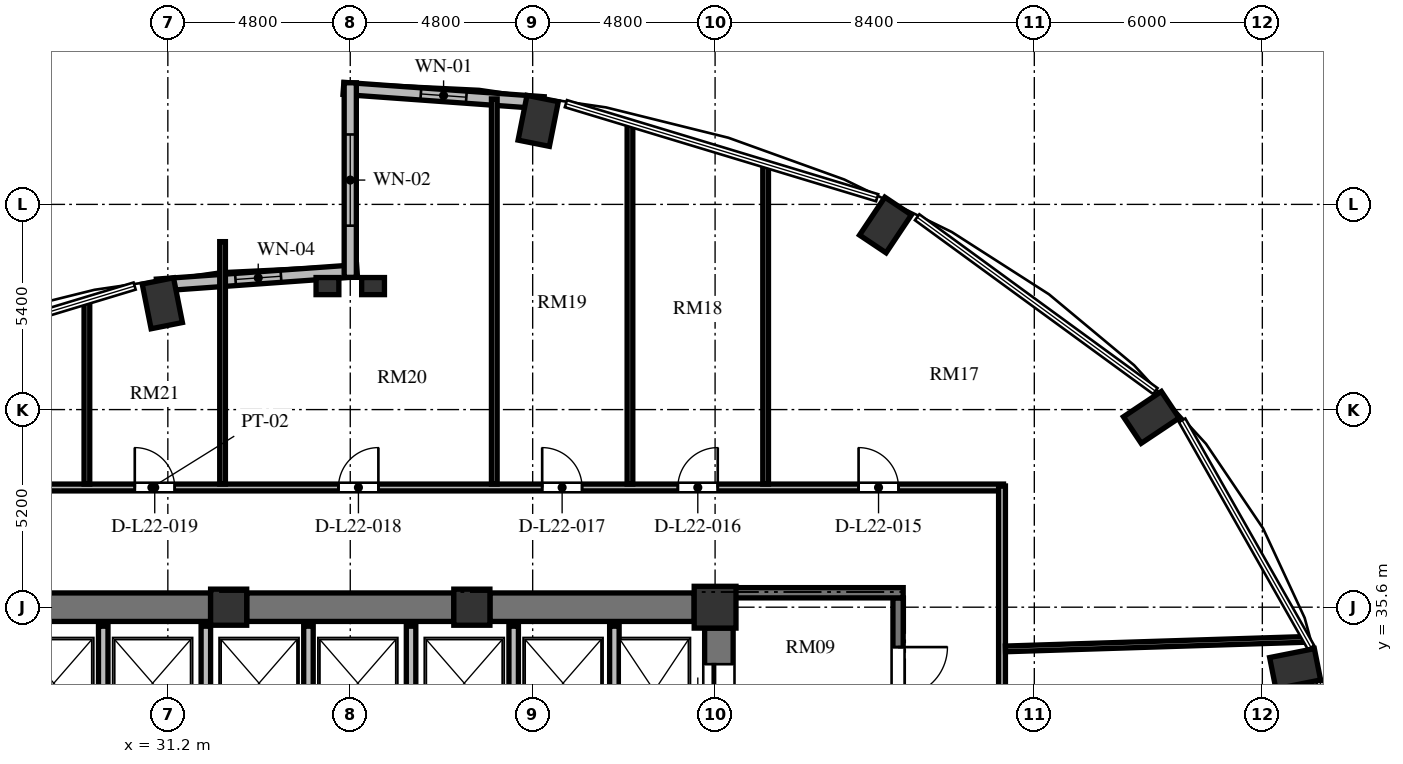
"""IFC4 building model, lengths in metres.
Left out: names, types, materials, properties, quantities, classifications, styles, units other than length and angle.
Written with IfcOpenShell. Run it as: python <this file> out.ifc"""

import sys

from ifc_helpers import new_model, si_unit, direction, frame, frame_2d, origin, origin_2d, place, context, subcontext, project, spatial, rectangle, extrude, element, fill, save


model = new_model("IFC4")
c1 = context("Model", 3, precision=1e-05, world=origin(), true_north=direction((0.0, 1.0)))
c2 = subcontext(c1, "Body", "Model", "MODEL_VIEW")
j1 = project(units=[si_unit("LENGTHUNIT", "METRE"), si_unit("PLANEANGLEUNIT", "RADIAN")], contexts=[c1])
p1 = place(None, origin())
s1 = spatial("IfcSite", under=j1, at=p1, CompositionType="ELEMENT")
p2 = place(p1, origin())
s2 = spatial("IfcBuilding", under=s1, at=p2, CompositionType="ELEMENT")
p3 = place(p2, frame((0.0, 0.0, 89.04)))
s3 = spatial("IfcBuildingStorey", under=s2, at=p3, CompositionType="ELEMENT", Elevation=89.04)
for number, where, z_axis, x_axis in (
    (1, (60.863, 33.98, 0.0), (0.0, 0.0, 1.0), (0.981, 0.195, 0.0)),
    (2, (57.078, 40.595, 0.0), (0.0, 0.0, 1.0), (0.831, 0.556, 0.0)),
    (3, (50.084, 45.657, 0.0), (0.0, 0.0, 1.0), (0.556, 0.831, 0.0)),
    (4, (40.946, 48.397, 0.0), (0.0, 0.0, 1.0), (0.195, 0.981, 0.0)),
    (5, (31.054, 43.597, 0.0), (0.0, 0.0, 1.0), (-0.195, 0.981, 0.0)),
):
    element("IfcColumn", number, at=place(p3, frame(where, z_axis=z_axis, x_axis=x_axis)), inside=s3, PredefinedType="COLUMN", context=c2, shape_type="SweptSolid", body=[
        extrude(rectangle(XDim=1.2, YDim=0.84, at=origin_2d()), origin(), (0.0, 0.0, 1.0), 3.648),
    ])
p4 = place(p3, frame((45.6, 35.6, 0.0), z_axis=(0.0, 0.0, 1.0), x_axis=(1.0, 0.0, 0.0)))
e6 = element("IfcColumn", 6, at=p4, inside=s3, PredefinedType="COLUMN", context=c2, shape_type="SweptSolid", body=[
    extrude(rectangle(XDim=1.1, YDim=1.1, at=origin_2d()), origin(), (0.0, 0.0, 1.0), 3.648),
])
for number, where, z_axis, x_axis in (
    (7, (39.2, 35.6, 0.0), (0.0, 0.0, 1.0), (1.0, 0.0, 0.0)),
    (8, (32.8, 35.6, 0.0), (0.0, 0.0, 1.0), (1.0, 0.0, 0.0)),
):
    element("IfcColumn", number, at=place(p3, frame(where, z_axis=z_axis, x_axis=x_axis)), inside=s3, PredefinedType="COLUMN", context=c2, shape_type="SweptSolid", body=[
        extrude(rectangle(XDim=0.95, YDim=0.95, at=origin_2d()), origin(), (0.0, 0.0, 1.0), 3.648),
    ])
for number, where, z_axis, x_axis in (
    (9, (35.4, 44.05, 0.0), (0.0, 0.0, 1.0), (1.0, 0.0, 0.0)),
    (10, (36.6, 44.05, 0.0), (0.0, 0.0, 1.0), (1.0, 0.0, 0.0)),
):
    element("IfcColumn", number, at=place(p3, frame(where, z_axis=z_axis, x_axis=x_axis)), inside=s3, PredefinedType="PILASTER", context=c2, shape_type="SweptSolid", body=[
        extrude(rectangle(XDim=0.6, YDim=0.45, at=origin_2d()), origin(), (0.0, 0.0, 1.0), 3.648),
    ])
p5 = place(p3, frame((45.7, 20.95, 0.0), z_axis=(0.0, 0.0, 1.0), x_axis=(0.0, 1.0, 0.0)))
e11 = element("IfcWall", 11, at=p5, inside=s3, PredefinedType="SHEAR", context=c2, shape_type="SweptSolid", body=[
    extrude(rectangle(XDim=14.1, YDim=0.75, at=frame_2d((7.05, 0.0))), origin(), (0.0, 0.0, 1.0), 3.648),
])
p6 = place(p5, frame((11.75, 0.0, 0.0)))
e12 = element("IfcOpeningElement", 12, at=p6, cuts=e11, PredefinedType="OPENING", context=c2, shape_type="SweptSolid", body=[
    extrude(rectangle(XDim=1.4, YDim=2.3, at=frame_2d((0.7, 1.15))), frame((0.0, 0.385, 0.0), z_axis=(0.0, -1.0, 0.0), x_axis=(1.0, 0.0, 0.0)), (0.0, 0.0, 1.0), 0.77),
])
p7 = place(p5, frame((0.95, 0.0, 0.0)))
e13 = element("IfcOpeningElement", 13, at=p7, cuts=e11, PredefinedType="OPENING", context=c2, shape_type="SweptSolid", body=[
    extrude(rectangle(XDim=1.4, YDim=2.3, at=frame_2d((0.7, 1.15))), frame((0.0, 0.385, 0.0), z_axis=(0.0, -1.0, 0.0), x_axis=(1.0, 0.0, 0.0)), (0.0, 0.0, 1.0), 0.77),
])
p8 = place(p3, frame((26.95, 35.6, 0.0), z_axis=(0.0, 0.0, 1.0), x_axis=(1.0, 0.0, 0.0)))
e14 = element("IfcWall", 14, at=p8, inside=s3, PredefinedType="SHEAR", context=c2, shape_type="SweptSolid", body=[
    extrude(rectangle(XDim=5.375, YDim=0.75, at=frame_2d((2.688, 0.0))), origin(), (0.0, 0.0, 1.0), 3.648),
])
p9 = place(p3, frame((33.275, 35.6, 0.0), z_axis=(0.0, 0.0, 1.0), x_axis=(1.0, 0.0, 0.0)))
e15 = element("IfcWall", 15, at=p9, inside=s3, PredefinedType="SHEAR", context=c2, shape_type="SweptSolid", body=[
    extrude(rectangle(XDim=5.45, YDim=0.75, at=frame_2d((2.725, 0.0))), origin(), (0.0, 0.0, 1.0), 3.648),
])
p10 = place(p3, frame((39.675, 35.6, 0.0), z_axis=(0.0, 0.0, 1.0), x_axis=(1.0, 0.0, 0.0)))
e16 = element("IfcWall", 16, at=p10, inside=s3, PredefinedType="SHEAR", context=c2, shape_type="SweptSolid", body=[
    extrude(rectangle(XDim=5.375, YDim=0.75, at=frame_2d((2.688, 0.0))), origin(), (0.0, 0.0, 1.0), 3.648),
])
p11 = place(p3, frame((41.091, 48.875, 0.0), z_axis=(0.0, 0.0, 1.0), x_axis=(-0.997432364291, 0.071614793619, 0.0)))
e17 = element("IfcWall", 17, at=p11, inside=s3, PredefinedType="SOLIDWALL", context=c2, shape_type="SweptSolid", body=[
    extrude(rectangle(XDim=5.284, YDim=0.32, at=frame_2d((2.642, 0.0))), origin(), (0.0, 0.0, 1.0), 3.428),
])
p12 = place(p11, frame((2.042, 0.0, 0.85)))
e18 = element("IfcOpeningElement", 18, at=p12, cuts=e17, PredefinedType="OPENING", context=c2, shape_type="SweptSolid", body=[
    extrude(rectangle(XDim=1.2, YDim=2.2, at=frame_2d((0.6, 1.1))), frame((0.0, 0.17, 0.0), z_axis=(0.0, -1.0, 0.0), x_axis=(1.0, 0.0, 0.0)), (0.0, 0.0, 1.0), 0.34),
])
p13 = place(p3, frame((36.179, 44.453, 0.0), z_axis=(0.0, 0.0, 1.0), x_axis=(-0.997431890304, -0.071621394884, 0.0)))
e19 = element("IfcWall", 19, at=p13, inside=s3, PredefinedType="SOLIDWALL", context=c2, shape_type="SweptSolid", body=[
    extrude(rectangle(XDim=5.284, YDim=0.32, at=frame_2d((2.642, 0.0))), origin(), (0.0, 0.0, 1.0), 3.428),
])
p14 = place(p13, frame((2.007, 0.0, 0.85)))
e20 = element("IfcOpeningElement", 20, at=p14, cuts=e19, PredefinedType="OPENING", context=c2, shape_type="SweptSolid", body=[
    extrude(rectangle(XDim=1.2, YDim=1.8, at=frame_2d((0.6, 0.9))), frame((0.0, 0.17, 0.0), z_axis=(0.0, -1.0, 0.0), x_axis=(1.0, 0.0, 0.0)), (0.0, 0.0, 1.0), 0.34),
])
p15 = place(p3, frame((36.0, 49.4, 0.0), z_axis=(0.0, 0.0, 1.0), x_axis=(0.0, -1.0, 0.0)))
e21 = element("IfcWall", 21, at=p15, inside=s3, PredefinedType="SOLIDWALL", context=c2, shape_type="SweptSolid", body=[
    extrude(rectangle(XDim=5.12, YDim=0.32, at=frame_2d((2.56, 0.0))), origin(), (0.0, 0.0, 1.0), 3.428),
])
p16 = place(p15, frame((1.36, 0.0, 0.84)))
e22 = element("IfcOpeningElement", 22, at=p16, cuts=e21, PredefinedType="OPENING", context=c2, shape_type="SweptSolid", body=[
    extrude(rectangle(XDim=2.4, YDim=2.04, at=frame_2d((1.2, 1.02))), frame((0.0, 0.17, 0.0), z_axis=(0.0, -1.0, 0.0), x_axis=(1.0, 0.0, 0.0)), (0.0, 0.0, 1.0), 0.34),
])
p17 = place(p3, frame((42.95, 31.92, 0.0), z_axis=(0.0, 0.0, 1.0), x_axis=(0.0, 1.0, 0.0)))
e23 = element("IfcWall", 23, at=p17, inside=s3, PredefinedType="SOLIDWALL", context=c2, shape_type="SweptSolid", body=[
    extrude(rectangle(XDim=3.18, YDim=0.25, at=frame_2d((1.59, 0.0))), origin(), (0.0, 0.0, 1.0), 3.428),
])
for number, where, z_axis, x_axis in (
    (24, (29.5, 32.42, 0.0), (0.0, 0.0, 1.0), (0.0, 1.0, 0.0)),
    (25, (32.2, 32.42, 0.0), (0.0, 0.0, 1.0), (0.0, 1.0, 0.0)),
    (26, (34.9, 32.42, 0.0), (0.0, 0.0, 1.0), (0.0, 1.0, 0.0)),
    (27, (37.6, 32.42, 0.0), (0.0, 0.0, 1.0), (0.0, 1.0, 0.0)),
    (28, (40.3, 32.42, 0.0), (0.0, 0.0, 1.0), (0.0, 1.0, 0.0)),
):
    element("IfcWall", number, at=place(p3, frame(where, z_axis=z_axis, x_axis=x_axis)), inside=s3, PredefinedType="SOLIDWALL", context=c2, shape_type="SweptSolid", body=[
        extrude(rectangle(XDim=2.68, YDim=0.25, at=frame_2d((1.34, 0.0))), origin(), (0.0, 0.0, 1.0), 3.428),
    ])
p18 = place(p3, frame((50.415, 35.845, 0.0), z_axis=(0.0, 0.0, 1.0), x_axis=(0.0, -1.0, 0.0)))
e29 = element("IfcWall", 29, at=p18, inside=s3, PredefinedType="SHEAR", context=c2, shape_type="SweptSolid", body=[
    extrude(rectangle(XDim=15.825, YDim=0.27, at=frame_2d((7.913, 0.0))), origin(), (0.0, 0.0, 1.0), 3.648),
])
p19 = place(p18, frame((4.445, 0.0, 0.0)))
e30 = element("IfcOpeningElement", 30, at=p19, cuts=e29, PredefinedType="OPENING", context=c2, shape_type="SweptSolid", body=[
    extrude(rectangle(XDim=1.2, YDim=2.15, at=frame_2d((0.6, 1.075))), frame((0.0, 0.145, 0.0), z_axis=(0.0, -1.0, 0.0), x_axis=(1.0, 0.0, 0.0)), (0.0, 0.0, 1.0), 0.29),
])
p20 = place(p18, frame((1.295, 0.0, 0.0)))
e31 = element("IfcOpeningElement", 31, at=p20, cuts=e29, PredefinedType="OPENING", context=c2, shape_type="SweptSolid", body=[
    extrude(rectangle(XDim=1.3, YDim=2.2, at=frame_2d((0.65, 1.1))), frame((0.0, 0.145, 0.0), z_axis=(0.0, -1.0, 0.0), x_axis=(1.0, 0.0, 0.0)), (0.0, 0.0, 1.0), 0.29),
])
p21 = place(p18, frame((13.095, 0.0, 0.0)))
e32 = element("IfcOpeningElement", 32, at=p21, cuts=e29, PredefinedType="OPENING", context=c2, shape_type="SweptSolid", body=[
    extrude(rectangle(XDim=1.3, YDim=2.2, at=frame_2d((0.65, 1.1))), frame((0.0, 0.145, 0.0), z_axis=(0.0, -1.0, 0.0), x_axis=(1.0, 0.0, 0.0)), (0.0, 0.0, 1.0), 0.29),
])
p22 = place(p3, frame((46.075, 35.98, 0.0), z_axis=(0.0, 0.0, 1.0), x_axis=(1.0, 0.0, 0.0)))
e33 = element("IfcWall", 33, at=p22, inside=s3, PredefinedType="SHEAR", context=c2, shape_type="SweptSolid", body=[
    extrude(rectangle(XDim=4.475, YDim=0.27, at=frame_2d((2.238, 0.0))), origin(), (0.0, 0.0, 1.0), 3.648),
])
p23 = place(p3, frame((23.31, 38.75, 0.0), z_axis=(0.0, 0.0, 1.0), x_axis=(1.0, 0.0, 0.0)))
e34 = element("IfcWall", 34, at=p23, inside=s3, PredefinedType="PARTITIONING", context=c2, shape_type="SweptSolid", body=[
    extrude(rectangle(XDim=29.88, YDim=0.18, at=frame_2d((14.94, 0.0))), origin(), (0.0, 0.0, 1.0), 3.053),
])
p24 = place(p23, frame((26.066, 0.0, 0.0)))
e35 = element("IfcOpeningElement", 35, at=p24, cuts=e34, PredefinedType="OPENING", context=c2, shape_type="SweptSolid", body=[
    extrude(rectangle(XDim=1.05, YDim=2.15, at=frame_2d((0.525, 1.075))), frame((0.0, 0.1, 0.0), z_axis=(0.0, -1.0, 0.0), x_axis=(1.0, 0.0, 0.0)), (0.0, 0.0, 1.0), 0.2),
])
p25 = place(p23, frame((21.31, 0.0, 0.0)))
e36 = element("IfcOpeningElement", 36, at=p25, cuts=e34, PredefinedType="OPENING", context=c2, shape_type="SweptSolid", body=[
    extrude(rectangle(XDim=1.05, YDim=2.15, at=frame_2d((0.525, 1.075))), frame((0.0, 0.1, 0.0), z_axis=(0.0, -1.0, 0.0), x_axis=(1.0, 0.0, 0.0)), (0.0, 0.0, 1.0), 0.2),
])
p26 = place(p23, frame((17.74, 0.0, 0.0)))
e37 = element("IfcOpeningElement", 37, at=p26, cuts=e34, PredefinedType="OPENING", context=c2, shape_type="SweptSolid", body=[
    extrude(rectangle(XDim=1.05, YDim=2.15, at=frame_2d((0.525, 1.075))), frame((0.0, 0.1, 0.0), z_axis=(0.0, -1.0, 0.0), x_axis=(1.0, 0.0, 0.0)), (0.0, 0.0, 1.0), 0.2),
])
p27 = place(p23, frame((12.38, 0.0, 0.0)))
e38 = element("IfcOpeningElement", 38, at=p27, cuts=e34, PredefinedType="OPENING", context=c2, shape_type="SweptSolid", body=[
    extrude(rectangle(XDim=1.05, YDim=2.15, at=frame_2d((0.525, 1.075))), frame((0.0, 0.1, 0.0), z_axis=(0.0, -1.0, 0.0), x_axis=(1.0, 0.0, 0.0)), (0.0, 0.0, 1.0), 0.2),
])
p28 = place(p23, frame((7.02, 0.0, 0.0)))
e39 = element("IfcOpeningElement", 39, at=p28, cuts=e34, PredefinedType="OPENING", context=c2, shape_type="SweptSolid", body=[
    extrude(rectangle(XDim=1.05, YDim=2.15, at=frame_2d((0.525, 1.075))), frame((0.0, 0.1, 0.0), z_axis=(0.0, -1.0, 0.0), x_axis=(1.0, 0.0, 0.0)), (0.0, 0.0, 1.0), 0.2),
])
p29 = place(p23, frame((2.514, 0.0, 0.0)))
e40 = element("IfcOpeningElement", 40, at=p29, cuts=e34, PredefinedType="OPENING", context=c2, shape_type="SweptSolid", body=[
    extrude(rectangle(XDim=1.05, YDim=2.15, at=frame_2d((0.525, 1.075))), frame((0.0, 0.1, 0.0), z_axis=(0.0, -1.0, 0.0), x_axis=(1.0, 0.0, 0.0)), (0.0, 0.0, 1.0), 0.2),
])
p30 = place(p3, frame((53.15, 38.79, 0.0), z_axis=(0.0, 0.0, 1.0), x_axis=(0.0, -1.0, 0.0)))
e41 = element("IfcWall", 41, at=p30, inside=s3, PredefinedType="PARTITIONING", context=c2, shape_type="SweptSolid", body=[
    extrude(rectangle(XDim=9.43, YDim=0.18, at=frame_2d((4.715, 0.0))), origin(), (0.0, 0.0, 1.0), 3.428),
])
p31 = place(p3, frame((53.24, 34.502, 0.0), z_axis=(0.0, 0.0, 1.0), x_axis=(0.999499445349, 0.031636351679, 0.0)))
e42 = element("IfcWall", 42, at=p31, inside=s3, PredefinedType="PARTITIONING", context=c2, shape_type="SweptSolid", body=[
    extrude(rectangle(XDim=7.933, YDim=0.15, at=frame_2d((3.967, 0.0))), origin(), (0.0, 0.0, 1.0), 2.813),
])
p32 = place(p3, frame((29.07, 38.84, 0.0), z_axis=(0.0, 0.0, 1.0), x_axis=(0.0, 1.0, 0.0)))
e43 = element("IfcWall", 43, at=p32, inside=s3, PredefinedType="PARTITIONING", context=c2, shape_type="SweptSolid", body=[
    extrude(rectangle(XDim=4.817, YDim=0.15, at=frame_2d((2.409, 0.0))), origin(), (0.0, 0.0, 1.0), 3.428),
])
p33 = place(p3, frame((32.64, 38.84, 0.0), z_axis=(0.0, 0.0, 1.0), x_axis=(0.0, 1.0, 0.0)))
e44 = element("IfcWall", 44, at=p33, inside=s3, PredefinedType="PARTITIONING", context=c2, shape_type="SweptSolid", body=[
    extrude(rectangle(XDim=6.38, YDim=0.15, at=frame_2d((3.19, 0.0))), origin(), (0.0, 0.0, 1.0), 3.428),
])
p34 = place(p3, frame((39.79, 38.84, 0.0), z_axis=(0.0, 0.0, 1.0), x_axis=(0.0, 1.0, 0.0)))
e45 = element("IfcWall", 45, at=p34, inside=s3, PredefinedType="PARTITIONING", context=c2, shape_type="SweptSolid", body=[
    extrude(rectangle(XDim=10.135, YDim=0.15, at=frame_2d((5.068, 0.0))), origin(), (0.0, 0.0, 1.0), 2.813),
])
p35 = place(p3, frame((43.36, 38.84, 0.0), z_axis=(0.0, 0.0, 1.0), x_axis=(0.0, 1.0, 0.0)))
e46 = element("IfcWall", 46, at=p35, inside=s3, PredefinedType="PARTITIONING", context=c2, shape_type="SweptSolid", body=[
    extrude(rectangle(XDim=9.487, YDim=0.15, at=frame_2d((4.744, 0.0))), origin(), (0.0, 0.0, 1.0), 3.428),
])
p36 = place(p3, frame((46.93, 38.84, 0.0), z_axis=(0.0, 0.0, 1.0), x_axis=(0.0, 1.0, 0.0)))
e47 = element("IfcWall", 47, at=p36, inside=s3, PredefinedType="PARTITIONING", context=c2, shape_type="SweptSolid", body=[
    extrude(rectangle(XDim=8.408, YDim=0.15, at=frame_2d((4.204, 0.0))), origin(), (0.0, 0.0, 1.0), 3.428),
])
p37 = place(p12, origin())
e48 = element("IfcWindow", 48, at=p37, inside=s3, PartitioningType="SINGLE_PANEL", PredefinedType="WINDOW", context=c2, shape_type="SweptSolid", body=[
    extrude(rectangle(XDim=1.2, YDim=2.2, at=frame_2d((0.6, 1.1))), frame((0.0, 0.03, 0.0), z_axis=(0.0, -1.0, 0.0), x_axis=(1.0, 0.0, 0.0)), (0.0, 0.0, 1.0), 0.06),
])
fill(e18, e48)
p38 = place(p14, origin())
e49 = element("IfcWindow", 49, at=p38, inside=s3, PartitioningType="SINGLE_PANEL", PredefinedType="WINDOW", context=c2, shape_type="SweptSolid", body=[
    extrude(rectangle(XDim=1.2, YDim=1.8, at=frame_2d((0.6, 0.9))), frame((0.0, 0.03, 0.0), z_axis=(0.0, -1.0, 0.0), x_axis=(1.0, 0.0, 0.0)), (0.0, 0.0, 1.0), 0.06),
])
fill(e20, e49)
p39 = place(p16, origin())
e50 = element("IfcWindow", 50, at=p39, inside=s3, PartitioningType="SINGLE_PANEL", PredefinedType="WINDOW", context=c2, shape_type="SweptSolid", body=[
    extrude(rectangle(XDim=2.4, YDim=2.04, at=frame_2d((1.2, 1.02))), frame((0.0, 0.03, 0.0), z_axis=(0.0, -1.0, 0.0), x_axis=(1.0, 0.0, 0.0)), (0.0, 0.0, 1.0), 0.06),
])
fill(e22, e50)
p40 = place(p6, origin())
e51 = element("IfcDoor", 51, at=p40, inside=s3, OperationType="SLIDING_TO_LEFT", PredefinedType="DOOR", context=c2, shape_type="SweptSolid", body=[
    extrude(rectangle(XDim=1.4, YDim=2.3, at=frame_2d((0.7, 1.15))), frame((0.0, 0.025, 0.0), z_axis=(0.0, -1.0, 0.0), x_axis=(1.0, 0.0, 0.0)), (0.0, 0.0, 1.0), 0.05),
])
fill(e12, e51)
p41 = place(p20, origin())
e52 = element("IfcDoor", 52, at=p41, inside=s3, OperationType="SINGLE_SWING_LEFT", PredefinedType="DOOR", context=c2, shape_type="SweptSolid", body=[
    extrude(rectangle(XDim=1.3, YDim=2.2, at=frame_2d((0.65, 1.1))), frame((0.0, 0.025, 0.0), z_axis=(0.0, -1.0, 0.0), x_axis=(1.0, 0.0, 0.0)), (0.0, 0.0, 1.0), 0.05),
])
fill(e31, e52)
p42 = place(p24, origin())
e53 = element("IfcDoor", 53, at=p42, inside=s3, OperationType="SINGLE_SWING_LEFT", PredefinedType="DOOR", context=c2, shape_type="SweptSolid", body=[
    extrude(rectangle(XDim=1.05, YDim=2.15, at=frame_2d((0.525, 1.075))), frame((0.0, 0.025, 0.0), z_axis=(0.0, -1.0, 0.0), x_axis=(1.0, 0.0, 0.0)), (0.0, 0.0, 1.0), 0.05),
])
fill(e35, e53)
p43 = place(p25, origin())
e54 = element("IfcDoor", 54, at=p43, inside=s3, OperationType="SINGLE_SWING_RIGHT", PredefinedType="DOOR", context=c2, shape_type="SweptSolid", body=[
    extrude(rectangle(XDim=1.05, YDim=2.15, at=frame_2d((0.525, 1.075))), frame((0.0, 0.025, 0.0), z_axis=(0.0, -1.0, 0.0), x_axis=(1.0, 0.0, 0.0)), (0.0, 0.0, 1.0), 0.05),
])
fill(e36, e54)
p44 = place(p26, origin())
e55 = element("IfcDoor", 55, at=p44, inside=s3, OperationType="SINGLE_SWING_LEFT", PredefinedType="DOOR", context=c2, shape_type="SweptSolid", body=[
    extrude(rectangle(XDim=1.05, YDim=2.15, at=frame_2d((0.525, 1.075))), frame((0.0, 0.025, 0.0), z_axis=(0.0, -1.0, 0.0), x_axis=(1.0, 0.0, 0.0)), (0.0, 0.0, 1.0), 0.05),
])
fill(e37, e55)
p45 = place(p27, origin())
e56 = element("IfcDoor", 56, at=p45, inside=s3, OperationType="SINGLE_SWING_RIGHT", PredefinedType="DOOR", context=c2, shape_type="SweptSolid", body=[
    extrude(rectangle(XDim=1.05, YDim=2.15, at=frame_2d((0.525, 1.075))), frame((0.0, 0.025, 0.0), z_axis=(0.0, -1.0, 0.0), x_axis=(1.0, 0.0, 0.0)), (0.0, 0.0, 1.0), 0.05),
])
fill(e38, e56)
p46 = place(p28, origin())
e57 = element("IfcDoor", 57, at=p46, inside=s3, OperationType="SINGLE_SWING_LEFT", PredefinedType="DOOR", context=c2, shape_type="SweptSolid", body=[
    extrude(rectangle(XDim=1.05, YDim=2.15, at=frame_2d((0.525, 1.075))), frame((0.0, 0.025, 0.0), z_axis=(0.0, -1.0, 0.0), x_axis=(1.0, 0.0, 0.0)), (0.0, 0.0, 1.0), 0.05),
])
fill(e39, e57)
save(model, sys.argv[1])
